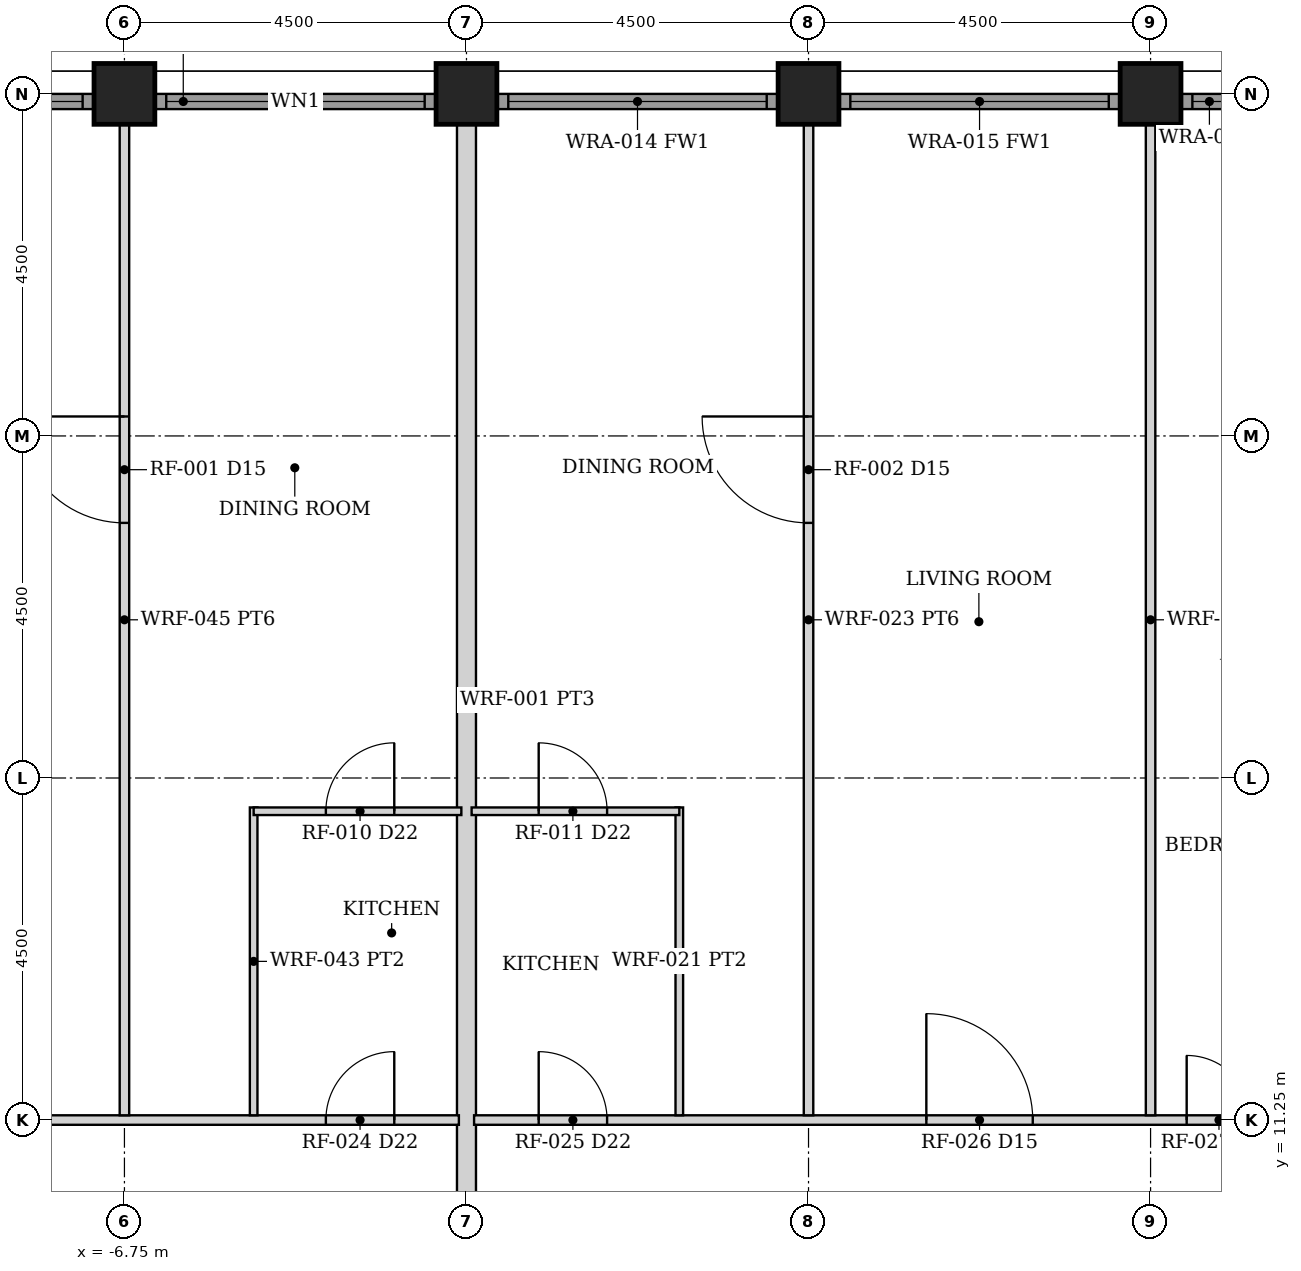
"""IFC4 building model, lengths in metres.
Left out: names, types, materials, properties, quantities, classifications, styles, units other than length and angle.
Written with IfcOpenShell. Run it as: python <this file> out.ifc"""

import sys

from ifc_helpers import new_model, si_unit, direction, frame, frame_2d, origin, origin_2d, place, context, subcontext, project, spatial, rectangle, hollow_rectangle, extrude, element, fill, save


model = new_model("IFC4")
c1 = context("Model", 3, precision=1e-05, world=origin(), true_north=direction((0.0, 1.0)))
c2 = subcontext(c1, "Body", "Model", "MODEL_VIEW")
j1 = project(units=[si_unit("LENGTHUNIT", "METRE"), si_unit("PLANEANGLEUNIT", "RADIAN")], contexts=[c1])
p1 = place(None, origin())
s1 = spatial("IfcSite", under=j1, at=p1, CompositionType="ELEMENT")
p2 = place(p1, origin())
s2 = spatial("IfcBuilding", under=s1, at=p2, CompositionType="ELEMENT")
p3 = place(p2, frame((0.0, 0.0, 79.0)))
s3 = spatial("IfcBuildingStorey", under=s2, at=p3, CompositionType="ELEMENT", Elevation=79.0)
for number, where, z_axis, x_axis in (
    (1, (-6.75, 24.75, 0.0), (0.0, 0.0, 1.0), (0.0, 1.0, 0.0)),
    (2, (-2.25, 24.75, 0.0), (0.0, 0.0, 1.0), (0.0, 1.0, 0.0)),
    (3, (2.25, 24.75, 0.0), (0.0, 0.0, 1.0), (0.0, 1.0, 0.0)),
    (4, (6.75, 24.75, 0.0), (0.0, 0.0, 1.0), (0.0, 1.0, 0.0)),
):
    element("IfcColumn", number, at=place(p3, frame(where, z_axis=z_axis, x_axis=x_axis)), inside=s3, PredefinedType="COLUMN", context=c2, shape_type="SweptSolid", body=[
        extrude(hollow_rectangle(XDim=0.8, YDim=0.8, WallThickness=0.06, at=origin_2d()), origin(), (0.0, 0.0, 1.0), 3.5),
    ])
p4 = place(p3, frame((-10.845, 24.65, 0.0), z_axis=(0.0, 0.0, 1.0), x_axis=(1.0, 0.0, 0.0)))
e5 = element("IfcWall", 5, at=p4, inside=s3, PredefinedType="SOLIDWALL", context=c2, shape_type="SweptSolid", body=[
    extrude(rectangle(XDim=3.69, YDim=0.2, at=frame_2d((1.845, 0.0))), origin(), (0.0, 0.0, 1.0), 2.379),
])
p5 = place(p4, frame((0.145, 0.0, 0.3)))
e6 = element("IfcOpeningElement", 6, at=p5, cuts=e5, PredefinedType="OPENING", context=c2, shape_type="SweptSolid", body=[
    extrude(rectangle(XDim=3.4, YDim=1.929, at=frame_2d((1.7, 0.964))), frame((0.0, 0.11, 0.0), z_axis=(0.0, -1.0, 0.0), x_axis=(1.0, 0.0, 0.0)), (0.0, 0.0, 1.0), 0.22),
])
p6 = place(p3, frame((-6.345, 24.65, 0.0), z_axis=(0.0, 0.0, 1.0), x_axis=(1.0, 0.0, 0.0)))
e7 = element("IfcWall", 7, at=p6, inside=s3, PredefinedType="SOLIDWALL", context=c2, shape_type="SweptSolid", body=[
    extrude(rectangle(XDim=3.69, YDim=0.2, at=frame_2d((1.845, 0.0))), origin(), (0.0, 0.0, 1.0), 2.379),
])
p7 = place(p6, frame((0.145, 0.0, 0.3)))
e8 = element("IfcOpeningElement", 8, at=p7, cuts=e7, PredefinedType="OPENING", context=c2, shape_type="SweptSolid", body=[
    extrude(rectangle(XDim=3.4, YDim=1.929, at=frame_2d((1.7, 0.964))), frame((0.0, 0.11, 0.0), z_axis=(0.0, -1.0, 0.0), x_axis=(1.0, 0.0, 0.0)), (0.0, 0.0, 1.0), 0.22),
])
p8 = place(p3, frame((-1.845, 24.65, 0.0), z_axis=(0.0, 0.0, 1.0), x_axis=(1.0, 0.0, 0.0)))
e9 = element("IfcWall", 9, at=p8, inside=s3, PredefinedType="SOLIDWALL", context=c2, shape_type="SweptSolid", body=[
    extrude(rectangle(XDim=3.69, YDim=0.2, at=frame_2d((1.845, 0.0))), origin(), (0.0, 0.0, 1.0), 2.379),
])
p9 = place(p8, frame((0.145, 0.0, 0.3)))
e10 = element("IfcOpeningElement", 10, at=p9, cuts=e9, PredefinedType="OPENING", context=c2, shape_type="SweptSolid", body=[
    extrude(rectangle(XDim=3.4, YDim=1.929, at=frame_2d((1.7, 0.964))), frame((0.0, 0.11, 0.0), z_axis=(0.0, -1.0, 0.0), x_axis=(1.0, 0.0, 0.0)), (0.0, 0.0, 1.0), 0.22),
])
p10 = place(p3, frame((2.655, 24.65, 0.0), z_axis=(0.0, 0.0, 1.0), x_axis=(1.0, 0.0, 0.0)))
e11 = element("IfcWall", 11, at=p10, inside=s3, PredefinedType="SOLIDWALL", context=c2, shape_type="SweptSolid", body=[
    extrude(rectangle(XDim=3.69, YDim=0.2, at=frame_2d((1.845, 0.0))), origin(), (0.0, 0.0, 1.0), 2.379),
])
p11 = place(p10, frame((0.145, 0.0, 0.3)))
e12 = element("IfcOpeningElement", 12, at=p11, cuts=e11, PredefinedType="OPENING", context=c2, shape_type="SweptSolid", body=[
    extrude(rectangle(XDim=3.4, YDim=1.929, at=frame_2d((1.7, 0.964))), frame((0.0, 0.11, 0.0), z_axis=(0.0, -1.0, 0.0), x_axis=(1.0, 0.0, 0.0)), (0.0, 0.0, 1.0), 0.22),
])
p12 = place(p3, frame((7.155, 24.65, 0.0), z_axis=(0.0, 0.0, 1.0), x_axis=(1.0, 0.0, 0.0)))
e13 = element("IfcWall", 13, at=p12, inside=s3, PredefinedType="SOLIDWALL", context=c2, shape_type="SweptSolid", body=[
    extrude(rectangle(XDim=3.69, YDim=0.2, at=frame_2d((1.845, 0.0))), origin(), (0.0, 0.0, 1.0), 2.379),
])
p13 = place(p12, frame((0.145, 0.0, 0.3)))
e14 = element("IfcOpeningElement", 14, at=p13, cuts=e13, PredefinedType="OPENING", context=c2, shape_type="SweptSolid", body=[
    extrude(rectangle(XDim=3.4, YDim=1.929, at=frame_2d((1.7, 0.964))), frame((0.0, 0.11, 0.0), z_axis=(0.0, -1.0, 0.0), x_axis=(1.0, 0.0, 0.0)), (0.0, 0.0, 1.0), 0.22),
])
p14 = place(p3, frame((-2.25, 9.2, 0.0), z_axis=(0.0, 0.0, 1.0), x_axis=(0.0, 1.0, 0.0)))
e15 = element("IfcWall", 15, at=p14, inside=s3, PredefinedType="PARTITIONING", context=c2, shape_type="SweptSolid", body=[
    extrude(rectangle(XDim=15.15, YDim=0.25, at=frame_2d((7.575, 0.0))), origin(), (0.0, 0.0, 1.0), 2.373),
])
p15 = place(p3, frame((-2.15, 11.25, 0.0), z_axis=(0.0, 0.0, 1.0), x_axis=(1.0, 0.0, 0.0)))
e16 = element("IfcWall", 16, at=p15, inside=s3, PredefinedType="PARTITIONING", context=c2, shape_type="SweptSolid", body=[
    extrude(rectangle(XDim=26.5, YDim=0.125, at=frame_2d((13.25, 0.0))), origin(), (0.0, 0.0, 1.0), 2.373),
])
p16 = place(p15, frame((0.85, 0.0, 0.0)))
e17 = element("IfcOpeningElement", 17, at=p16, cuts=e16, PredefinedType="OPENING", context=c2, shape_type="SweptSolid", body=[
    extrude(rectangle(XDim=0.9, YDim=2.1, at=frame_2d((0.45, 1.05))), frame((0.0, 0.073, 0.0), z_axis=(0.0, -1.0, 0.0), x_axis=(1.0, 0.0, 0.0)), (0.0, 0.0, 1.0), 0.145),
])
p17 = place(p15, frame((5.95, 0.0, 0.0)))
e18 = element("IfcOpeningElement", 18, at=p17, cuts=e16, PredefinedType="OPENING", context=c2, shape_type="SweptSolid", body=[
    extrude(rectangle(XDim=1.4, YDim=2.1, at=frame_2d((0.7, 1.05))), frame((0.0, 0.073, 0.0), z_axis=(0.0, -1.0, 0.0), x_axis=(1.0, 0.0, 0.0)), (0.0, 0.0, 1.0), 0.145),
])
p18 = place(p15, frame((9.375, 0.0, 0.0)))
e19 = element("IfcOpeningElement", 19, at=p18, cuts=e16, PredefinedType="OPENING", context=c2, shape_type="SweptSolid", body=[
    extrude(rectangle(XDim=0.85, YDim=2.1, at=frame_2d((0.425, 1.05))), frame((0.0, 0.073, 0.0), z_axis=(0.0, -1.0, 0.0), x_axis=(1.0, 0.0, 0.0)), (0.0, 0.0, 1.0), 0.145),
])
p19 = place(p15, frame((11.57, 0.0, 0.0)))
e20 = element("IfcOpeningElement", 20, at=p19, cuts=e16, PredefinedType="OPENING", context=c2, shape_type="SweptSolid", body=[
    extrude(rectangle(XDim=0.9, YDim=2.1, at=frame_2d((0.45, 1.05))), frame((0.0, 0.073, 0.0), z_axis=(0.0, -1.0, 0.0), x_axis=(1.0, 0.0, 0.0)), (0.0, 0.0, 1.0), 0.145),
])
p20 = place(p15, frame((13.875, 0.0, 0.0)))
e21 = element("IfcOpeningElement", 21, at=p20, cuts=e16, PredefinedType="OPENING", context=c2, shape_type="SweptSolid", body=[
    extrude(rectangle(XDim=0.85, YDim=2.1, at=frame_2d((0.425, 1.05))), frame((0.0, 0.073, 0.0), z_axis=(0.0, -1.0, 0.0), x_axis=(1.0, 0.0, 0.0)), (0.0, 0.0, 1.0), 0.145),
])
p21 = place(p15, frame((18.375, 0.0, 0.0)))
e22 = element("IfcOpeningElement", 22, at=p21, cuts=e16, PredefinedType="OPENING", context=c2, shape_type="SweptSolid", body=[
    extrude(rectangle(XDim=0.85, YDim=2.1, at=frame_2d((0.425, 1.05))), frame((0.0, 0.073, 0.0), z_axis=(0.0, -1.0, 0.0), x_axis=(1.0, 0.0, 0.0)), (0.0, 0.0, 1.0), 0.145),
])
p22 = place(p15, frame((22.875, 0.0, 0.0)))
e23 = element("IfcOpeningElement", 23, at=p22, cuts=e16, PredefinedType="OPENING", context=c2, shape_type="SweptSolid", body=[
    extrude(rectangle(XDim=0.85, YDim=2.1, at=frame_2d((0.425, 1.05))), frame((0.0, 0.073, 0.0), z_axis=(0.0, -1.0, 0.0), x_axis=(1.0, 0.0, 0.0)), (0.0, 0.0, 1.0), 0.145),
])
p23 = place(p3, frame((0.55, 11.312, 0.0), z_axis=(0.0, 0.0, 1.0), x_axis=(0.0, 1.0, 0.0)))
e24 = element("IfcWall", 24, at=p23, inside=s3, PredefinedType="PARTITIONING", context=c2, shape_type="SweptSolid", body=[
    extrude(rectangle(XDim=4.05, YDim=0.1, at=frame_2d((2.025, 0.0))), origin(), (0.0, 0.0, 1.0), 2.373),
])
p24 = place(p3, frame((-2.183, 15.312, 0.0), z_axis=(0.0, 0.0, 1.0), x_axis=(1.0, 0.0, 0.0)))
e25 = element("IfcWall", 25, at=p24, inside=s3, PredefinedType="PARTITIONING", context=c2, shape_type="SweptSolid", body=[
    extrude(rectangle(XDim=2.733, YDim=0.1, at=frame_2d((1.366, 0.0))), origin(), (0.0, 0.0, 1.0), 2.373),
])
p25 = place(p24, frame((0.883, 0.0, 0.0)))
e26 = element("IfcOpeningElement", 26, at=p25, cuts=e25, PredefinedType="OPENING", context=c2, shape_type="SweptSolid", body=[
    extrude(rectangle(XDim=0.9, YDim=2.1, at=frame_2d((0.45, 1.05))), frame((0.0, 0.06, 0.0), z_axis=(0.0, -1.0, 0.0), x_axis=(1.0, 0.0, 0.0)), (0.0, 0.0, 1.0), 0.12),
])
p26 = place(p3, frame((2.25, 11.312, 0.0), z_axis=(0.0, 0.0, 1.0), x_axis=(0.0, 1.0, 0.0)))
e27 = element("IfcWall", 27, at=p26, inside=s3, PredefinedType="PARTITIONING", context=c2, shape_type="SweptSolid", body=[
    extrude(rectangle(XDim=13.038, YDim=0.125, at=frame_2d((6.519, 0.0))), origin(), (0.0, 0.0, 1.0), 2.373),
])
p27 = place(p26, frame((7.794, 0.0, 0.0)))
e28 = element("IfcOpeningElement", 28, at=p27, cuts=e27, PredefinedType="OPENING", context=c2, shape_type="SweptSolid", body=[
    extrude(rectangle(XDim=1.4, YDim=2.1, at=frame_2d((0.7, 1.05))), frame((0.0, 0.073, 0.0), z_axis=(0.0, -1.0, 0.0), x_axis=(1.0, 0.0, 0.0)), (0.0, 0.0, 1.0), 0.145),
])
p28 = place(p3, frame((6.75, 11.312, 0.0), z_axis=(0.0, 0.0, 1.0), x_axis=(0.0, 1.0, 0.0)))
e29 = element("IfcWall", 29, at=p28, inside=s3, PredefinedType="PARTITIONING", context=c2, shape_type="SweptSolid", body=[
    extrude(rectangle(XDim=13.038, YDim=0.125, at=frame_2d((6.519, 0.0))), origin(), (0.0, 0.0, 1.0), 2.373),
])
p29 = place(p3, frame((-24.35, 11.25, 0.0), z_axis=(0.0, 0.0, 1.0), x_axis=(1.0, 0.0, 0.0)))
e30 = element("IfcWall", 30, at=p29, inside=s3, PredefinedType="PARTITIONING", context=c2, shape_type="SweptSolid", body=[
    extrude(rectangle(XDim=22.0, YDim=0.125, at=frame_2d((11.0, 0.0))), origin(), (0.0, 0.0, 1.0), 2.373),
])
p30 = place(p29, frame((20.25, 0.0, 0.0)))
e31 = element("IfcOpeningElement", 31, at=p30, cuts=e30, PredefinedType="OPENING", context=c2, shape_type="SweptSolid", body=[
    extrude(rectangle(XDim=0.9, YDim=2.1, at=frame_2d((0.45, 1.05))), frame((0.0, 0.073, 0.0), z_axis=(0.0, -1.0, 0.0), x_axis=(1.0, 0.0, 0.0)), (0.0, 0.0, 1.0), 0.145),
])
p31 = place(p29, frame((14.65, 0.0, 0.0)))
e32 = element("IfcOpeningElement", 32, at=p31, cuts=e30, PredefinedType="OPENING", context=c2, shape_type="SweptSolid", body=[
    extrude(rectangle(XDim=1.4, YDim=2.1, at=frame_2d((0.7, 1.05))), frame((0.0, 0.073, 0.0), z_axis=(0.0, -1.0, 0.0), x_axis=(1.0, 0.0, 0.0)), (0.0, 0.0, 1.0), 0.145),
])
p32 = place(p29, frame((11.775, 0.0, 0.0)))
e33 = element("IfcOpeningElement", 33, at=p32, cuts=e30, PredefinedType="OPENING", context=c2, shape_type="SweptSolid", body=[
    extrude(rectangle(XDim=0.85, YDim=2.1, at=frame_2d((0.425, 1.05))), frame((0.0, 0.073, 0.0), z_axis=(0.0, -1.0, 0.0), x_axis=(1.0, 0.0, 0.0)), (0.0, 0.0, 1.0), 0.145),
])
p33 = place(p29, frame((9.53, 0.0, 0.0)))
e34 = element("IfcOpeningElement", 34, at=p33, cuts=e30, PredefinedType="OPENING", context=c2, shape_type="SweptSolid", body=[
    extrude(rectangle(XDim=0.9, YDim=2.1, at=frame_2d((0.45, 1.05))), frame((0.0, 0.073, 0.0), z_axis=(0.0, -1.0, 0.0), x_axis=(1.0, 0.0, 0.0)), (0.0, 0.0, 1.0), 0.145),
])
p34 = place(p29, frame((7.275, 0.0, 0.0)))
e35 = element("IfcOpeningElement", 35, at=p34, cuts=e30, PredefinedType="OPENING", context=c2, shape_type="SweptSolid", body=[
    extrude(rectangle(XDim=0.85, YDim=2.1, at=frame_2d((0.425, 1.05))), frame((0.0, 0.073, 0.0), z_axis=(0.0, -1.0, 0.0), x_axis=(1.0, 0.0, 0.0)), (0.0, 0.0, 1.0), 0.145),
])
p35 = place(p29, frame((2.775, 0.0, 0.0)))
e36 = element("IfcOpeningElement", 36, at=p35, cuts=e30, PredefinedType="OPENING", context=c2, shape_type="SweptSolid", body=[
    extrude(rectangle(XDim=0.85, YDim=2.1, at=frame_2d((0.425, 1.05))), frame((0.0, 0.073, 0.0), z_axis=(0.0, -1.0, 0.0), x_axis=(1.0, 0.0, 0.0)), (0.0, 0.0, 1.0), 0.145),
])
p36 = place(p3, frame((-5.05, 11.312, 0.0), z_axis=(0.0, 0.0, 1.0), x_axis=(0.0, 1.0, 0.0)))
e37 = element("IfcWall", 37, at=p36, inside=s3, PredefinedType="PARTITIONING", context=c2, shape_type="SweptSolid", body=[
    extrude(rectangle(XDim=4.05, YDim=0.1, at=frame_2d((2.025, 0.0))), origin(), (0.0, 0.0, 1.0), 2.373),
])
p37 = place(p3, frame((-5.05, 15.312, 0.0), z_axis=(0.0, 0.0, 1.0), x_axis=(1.0, 0.0, 0.0)))
e38 = element("IfcWall", 38, at=p37, inside=s3, PredefinedType="PARTITIONING", context=c2, shape_type="SweptSolid", body=[
    extrude(rectangle(XDim=2.733, YDim=0.1, at=frame_2d((1.366, 0.0))), origin(), (0.0, 0.0, 1.0), 2.373),
])
p38 = place(p37, frame((0.95, 0.0, 0.0)))
e39 = element("IfcOpeningElement", 39, at=p38, cuts=e38, PredefinedType="OPENING", context=c2, shape_type="SweptSolid", body=[
    extrude(rectangle(XDim=0.9, YDim=2.1, at=frame_2d((0.45, 1.05))), frame((0.0, 0.06, 0.0), z_axis=(0.0, -1.0, 0.0), x_axis=(1.0, 0.0, 0.0)), (0.0, 0.0, 1.0), 0.12),
])
p39 = place(p3, frame((-6.75, 11.312, 0.0), z_axis=(0.0, 0.0, 1.0), x_axis=(0.0, 1.0, 0.0)))
e40 = element("IfcWall", 40, at=p39, inside=s3, PredefinedType="PARTITIONING", context=c2, shape_type="SweptSolid", body=[
    extrude(rectangle(XDim=13.038, YDim=0.125, at=frame_2d((6.519, 0.0))), origin(), (0.0, 0.0, 1.0), 2.373),
])
p40 = place(p39, frame((7.794, 0.0, 0.0)))
e41 = element("IfcOpeningElement", 41, at=p40, cuts=e40, PredefinedType="OPENING", context=c2, shape_type="SweptSolid", body=[
    extrude(rectangle(XDim=1.4, YDim=2.1, at=frame_2d((0.7, 1.05))), frame((0.0, 0.073, 0.0), z_axis=(0.0, -1.0, 0.0), x_axis=(1.0, 0.0, 0.0)), (0.0, 0.0, 1.0), 0.145),
])
p41 = place(p5, origin())
e42 = element("IfcWindow", 42, at=p41, inside=s3, PartitioningType="SINGLE_PANEL", PredefinedType="WINDOW", context=c2, shape_type="SweptSolid", body=[
    extrude(rectangle(XDim=3.4, YDim=1.929, at=frame_2d((1.7, 0.964))), frame((0.0, 0.03, 0.0), z_axis=(0.0, -1.0, 0.0), x_axis=(1.0, 0.0, 0.0)), (0.0, 0.0, 1.0), 0.06),
])
fill(e6, e42)
p42 = place(p7, origin())
e43 = element("IfcWindow", 43, at=p42, inside=s3, PartitioningType="SINGLE_PANEL", PredefinedType="WINDOW", context=c2, shape_type="SweptSolid", body=[
    extrude(rectangle(XDim=3.4, YDim=1.929, at=frame_2d((1.7, 0.964))), frame((0.0, 0.03, 0.0), z_axis=(0.0, -1.0, 0.0), x_axis=(1.0, 0.0, 0.0)), (0.0, 0.0, 1.0), 0.06),
])
fill(e8, e43)
p43 = place(p9, origin())
e44 = element("IfcWindow", 44, at=p43, inside=s3, PartitioningType="SINGLE_PANEL", PredefinedType="WINDOW", context=c2, shape_type="SweptSolid", body=[
    extrude(rectangle(XDim=3.4, YDim=1.929, at=frame_2d((1.7, 0.964))), frame((0.0, 0.03, 0.0), z_axis=(0.0, -1.0, 0.0), x_axis=(1.0, 0.0, 0.0)), (0.0, 0.0, 1.0), 0.06),
])
fill(e10, e44)
p44 = place(p11, origin())
e45 = element("IfcWindow", 45, at=p44, inside=s3, PartitioningType="SINGLE_PANEL", PredefinedType="WINDOW", context=c2, shape_type="SweptSolid", body=[
    extrude(rectangle(XDim=3.4, YDim=1.929, at=frame_2d((1.7, 0.964))), frame((0.0, 0.03, 0.0), z_axis=(0.0, -1.0, 0.0), x_axis=(1.0, 0.0, 0.0)), (0.0, 0.0, 1.0), 0.06),
])
fill(e12, e45)
p45 = place(p13, origin())
e46 = element("IfcWindow", 46, at=p45, inside=s3, PartitioningType="SINGLE_PANEL", PredefinedType="WINDOW", context=c2, shape_type="SweptSolid", body=[
    extrude(rectangle(XDim=3.4, YDim=1.929, at=frame_2d((1.7, 0.964))), frame((0.0, 0.03, 0.0), z_axis=(0.0, -1.0, 0.0), x_axis=(1.0, 0.0, 0.0)), (0.0, 0.0, 1.0), 0.06),
])
fill(e14, e46)
p46 = place(p16, origin())
e47 = element("IfcDoor", 47, at=p46, inside=s3, OperationType="SINGLE_SWING_LEFT", PredefinedType="DOOR", context=c2, shape_type="SweptSolid", body=[
    extrude(rectangle(XDim=0.9, YDim=2.1, at=frame_2d((0.45, 1.05))), frame((0.0, 0.025, 0.0), z_axis=(0.0, -1.0, 0.0), x_axis=(1.0, 0.0, 0.0)), (0.0, 0.0, 1.0), 0.05),
])
fill(e17, e47)
p47 = place(p17, origin())
e48 = element("IfcDoor", 48, at=p47, inside=s3, OperationType="SINGLE_SWING_LEFT", PredefinedType="DOOR", context=c2, shape_type="SweptSolid", body=[
    extrude(rectangle(XDim=1.4, YDim=2.1, at=frame_2d((0.7, 1.05))), frame((0.0, 0.025, 0.0), z_axis=(0.0, -1.0, 0.0), x_axis=(1.0, 0.0, 0.0)), (0.0, 0.0, 1.0), 0.05),
])
fill(e18, e48)
p48 = place(p27, origin())
e49 = element("IfcDoor", 49, at=p48, inside=s3, OperationType="SINGLE_SWING_RIGHT", PredefinedType="DOOR", context=c2, shape_type="SweptSolid", body=[
    extrude(rectangle(XDim=1.4, YDim=2.1, at=frame_2d((0.7, 1.05))), frame((0.0, 0.025, 0.0), z_axis=(0.0, -1.0, 0.0), x_axis=(1.0, 0.0, 0.0)), (0.0, 0.0, 1.0), 0.05),
])
fill(e28, e49)
p49 = place(p25, origin())
e50 = element("IfcDoor", 50, at=p49, inside=s3, OperationType="SINGLE_SWING_LEFT", PredefinedType="DOOR", context=c2, shape_type="SweptSolid", body=[
    extrude(rectangle(XDim=0.9, YDim=2.1, at=frame_2d((0.45, 1.05))), frame((0.0, 0.025, 0.0), z_axis=(0.0, -1.0, 0.0), x_axis=(1.0, 0.0, 0.0)), (0.0, 0.0, 1.0), 0.05),
])
fill(e26, e50)
p50 = place(p18, origin())
e51 = element("IfcDoor", 51, at=p50, inside=s3, OperationType="SINGLE_SWING_LEFT", PredefinedType="DOOR", context=c2, shape_type="SweptSolid", body=[
    extrude(rectangle(XDim=0.85, YDim=2.1, at=frame_2d((0.425, 1.05))), frame((0.0, 0.025, 0.0), z_axis=(0.0, -1.0, 0.0), x_axis=(1.0, 0.0, 0.0)), (0.0, 0.0, 1.0), 0.05),
])
fill(e19, e51)
p51 = place(p30, origin())
e52 = element("IfcDoor", 52, at=p51, inside=s3, OperationType="SINGLE_SWING_RIGHT", PredefinedType="DOOR", context=c2, shape_type="SweptSolid", body=[
    extrude(rectangle(XDim=0.9, YDim=2.1, at=frame_2d((0.45, 1.05))), frame((0.0, 0.025, 0.0), z_axis=(0.0, -1.0, 0.0), x_axis=(1.0, 0.0, 0.0)), (0.0, 0.0, 1.0), 0.05),
])
fill(e31, e52)
p52 = place(p40, origin())
e53 = element("IfcDoor", 53, at=p52, inside=s3, OperationType="SINGLE_SWING_RIGHT", PredefinedType="DOOR", context=c2, shape_type="SweptSolid", body=[
    extrude(rectangle(XDim=1.4, YDim=2.1, at=frame_2d((0.7, 1.05))), frame((0.0, 0.025, 0.0), z_axis=(0.0, -1.0, 0.0), x_axis=(1.0, 0.0, 0.0)), (0.0, 0.0, 1.0), 0.05),
])
fill(e41, e53)
p53 = place(p38, origin())
e54 = element("IfcDoor", 54, at=p53, inside=s3, OperationType="SINGLE_SWING_RIGHT", PredefinedType="DOOR", context=c2, shape_type="SweptSolid", body=[
    extrude(rectangle(XDim=0.9, YDim=2.1, at=frame_2d((0.45, 1.05))), frame((0.0, 0.025, 0.0), z_axis=(0.0, -1.0, 0.0), x_axis=(1.0, 0.0, 0.0)), (0.0, 0.0, 1.0), 0.05),
])
fill(e39, e54)
save(model, sys.argv[1])
